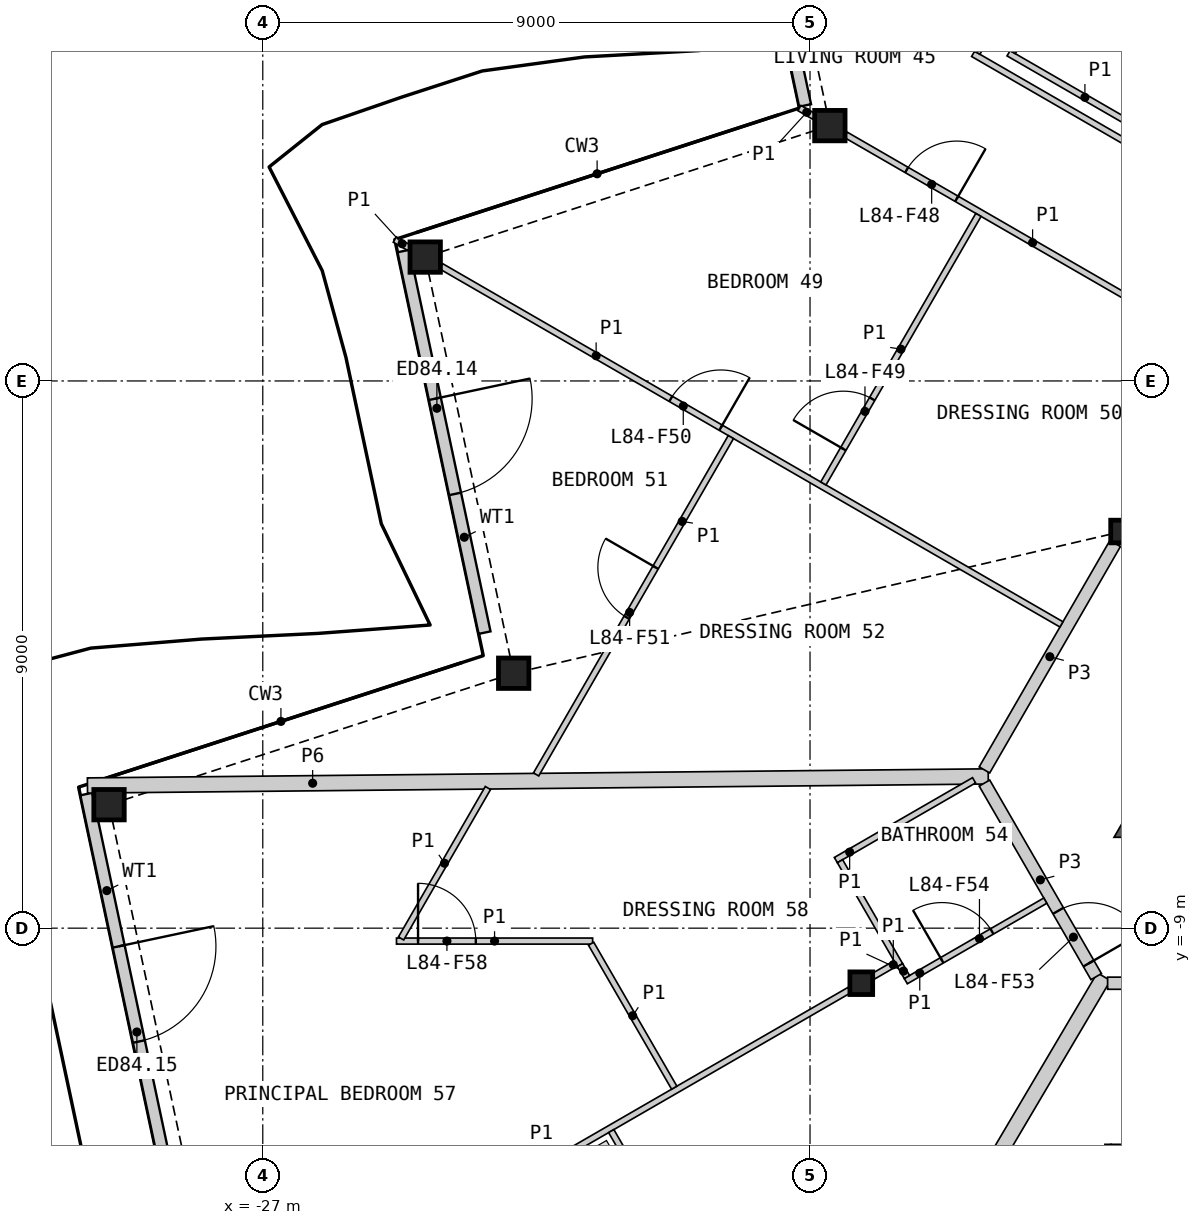
"""IFC4 building model, lengths in metres.
Left out: names, types, materials, properties, quantities, classifications, styles, units other than length and angle.
Written with IfcOpenShell. Run it as: python <this file> out.ifc"""

import sys

from ifc_helpers import new_model, si_unit, direction, frame, frame_2d, origin, origin_2d, place, context, subcontext, project, spatial, polyline, rectangle, hollow_rectangle, i_section, outline, extrude, element, fill, save


model = new_model("IFC4")
c1 = context("Model", 3, precision=1e-05, world=origin(), true_north=direction((0.0, 1.0)))
c2 = subcontext(c1, "Body", "Model", "MODEL_VIEW")
j1 = project(units=[si_unit("LENGTHUNIT", "METRE"), si_unit("PLANEANGLEUNIT", "RADIAN")], contexts=[c1])
p1 = place(None, origin())
s1 = spatial("IfcSite", under=j1, at=p1, CompositionType="ELEMENT")
p2 = place(p1, origin())
s2 = spatial("IfcBuilding", under=s1, at=p2, CompositionType="ELEMENT")
p3 = place(p2, frame((0.0, 0.0, 374.6)))
s3 = spatial("IfcBuildingStorey", under=s2, at=p3, CompositionType="ELEMENT", Elevation=374.6)
for number, where, z_axis, x_axis in (
    (1, (-17.674, 4.199, 0.0), (0.0, 0.0, 1.0), (1.0, 0.0, 0.0)),
    (2, (-24.329, 2.037, 0.0), (0.0, 0.0, 1.0), (1.0, 0.0, 0.0)),
    (3, (-22.874, -4.807, 0.0), (0.0, 0.0, 1.0), (1.0, 0.0, 0.0)),
    (4, (-29.529, -6.969, 0.0), (0.0, 0.0, 1.0), (1.0, 0.0, 0.0)),
):
    element("IfcColumn", number, at=place(p3, frame(where, z_axis=z_axis, x_axis=x_axis)), inside=s3, PredefinedType="COLUMN", context=c2, shape_type="SweptSolid", body=[
        extrude(hollow_rectangle(XDim=0.5, YDim=0.5, WallThickness=0.03, at=origin_2d()), origin(), (0.0, 0.0, 1.0), 3.4),
    ])
for number, where, z_axis, x_axis in (
    (5, (-12.868, -2.476, 0.0), (0.0, 0.0, 1.0), (1.0, 0.0, 0.0)),
    (6, (-17.157, -9.906, 0.0), (0.0, 0.0, 1.0), (1.0, 0.0, 0.0)),
):
    element("IfcColumn", number, at=place(p3, frame(where, z_axis=z_axis, x_axis=x_axis)), inside=s3, PredefinedType="COLUMN", context=c2, shape_type="SweptSolid", body=[
        extrude(i_section(OverallWidth=0.374, OverallDepth=0.372, WebThickness=0.016, FlangeThickness=0.026, at=origin_2d()), origin(), (0.0, 0.0, 1.0), 3.4),
    ])
p4 = place(p3, frame((-19.477, 11.1, 0.0), z_axis=(0.0, 0.0, 1.0), x_axis=(0.207910061304, -0.978147947096, 0.0)))
e7 = element("IfcWall", 7, at=p4, inside=s3, PredefinedType="SOLIDWALL", context=c2, shape_type="SweptSolid", body=[
    extrude(rectangle(XDim=6.716, YDim=0.2, at=frame_2d((3.358, 0.0))), origin(), (0.0, 0.0, 1.0), 2.634),
])
p5 = place(p4, frame((2.439, 0.0, 0.0)))
e8 = element("IfcOpeningElement", 8, at=p5, cuts=e7, PredefinedType="OPENING", context=c2, shape_type="SweptSolid", body=[
    extrude(rectangle(XDim=1.6, YDim=2.25, at=frame_2d((0.8, 1.125))), frame((0.0, 0.11, 0.0), z_axis=(0.0, -1.0, 0.0), x_axis=(1.0, 0.0, 0.0)), (0.0, 0.0, 1.0), 0.22),
])
p6 = place(p3, frame((-24.687, 2.137, 0.0), z_axis=(0.0, 0.0, 1.0), x_axis=(0.207904718109, -0.978149082803, 0.0)))
e9 = element("IfcWall", 9, at=p6, inside=s3, PredefinedType="SOLIDWALL", context=c2, shape_type="SweptSolid", body=[
    extrude(rectangle(XDim=6.416, YDim=0.2, at=frame_2d((3.208, 0.0))), origin(), (0.0, 0.0, 1.0), 2.634),
])
p7 = place(p6, frame((2.484, 0.0, 0.0)))
e10 = element("IfcOpeningElement", 10, at=p7, cuts=e9, PredefinedType="OPENING", context=c2, shape_type="SweptSolid", body=[
    extrude(rectangle(XDim=1.6, YDim=2.25, at=frame_2d((0.8, 1.125))), frame((0.0, 0.11, 0.0), z_axis=(0.0, -1.0, 0.0), x_axis=(1.0, 0.0, 0.0)), (0.0, 0.0, 1.0), 0.22),
])
p8 = place(p3, frame((-29.903, -6.795, 0.0), z_axis=(0.0, 0.0, 1.0), x_axis=(0.207923959653, -0.978144992832, 0.0)))
e11 = element("IfcWall", 11, at=p8, inside=s3, PredefinedType="SOLIDWALL", context=c2, shape_type="SweptSolid", body=[
    extrude(rectangle(XDim=6.493, YDim=0.2, at=frame_2d((3.247, 0.0))), origin(), (0.0, 0.0, 1.0), 2.634),
])
p9 = place(p8, frame((2.561, 0.0, 0.0)))
e12 = element("IfcOpeningElement", 12, at=p9, cuts=e11, PredefinedType="OPENING", context=c2, shape_type="SweptSolid", body=[
    extrude(rectangle(XDim=1.6, YDim=2.25, at=frame_2d((0.8, 1.125))), frame((0.0, 0.11, 0.0), z_axis=(0.0, -1.0, 0.0), x_axis=(1.0, 0.0, 0.0)), (0.0, 0.0, 1.0), 0.22),
])
p10 = place(p3, origin())
e13 = element("IfcWall", 13, at=p10, inside=s3, PredefinedType="SHEAR", context=c2, shape_type="SweptSolid", body=[
    extrude(outline(polyline([(-12.48, -6.606), (-11.961, -6.906), (-11.961, -7.506), (-13.0, -7.506), (-12.48, -6.606)])), origin(), (0.0, 0.0, 1.0), 3.1),
])
p11 = place(p3, frame((-29.883, -6.654, 0.0), z_axis=(0.0, 0.0, 1.0), x_axis=(0.999949143254, 0.010085182526, 0.0)))
e14 = element("IfcWall", 14, at=p11, inside=s3, PredefinedType="PARTITIONING", context=c2, shape_type="SweptSolid", body=[
    extrude(rectangle(XDim=14.815, YDim=0.25, at=frame_2d((7.408, 0.0))), origin(), (0.0, 0.0, 1.0), 2.33),
])
p12 = place(p3, frame((-20.351, -21.956, 0.0), z_axis=(0.0, 0.0, 1.0), x_axis=(0.508713003719, 0.860936164793, 0.0)))
e15 = element("IfcWall", 15, at=p12, inside=s3, PredefinedType="PARTITIONING", context=c2, shape_type="SweptSolid", body=[
    extrude(rectangle(XDim=14.122, YDim=0.25, at=frame_2d((7.061, 0.0))), origin(), (0.0, 0.0, 1.0), 2.33),
])
p13 = place(p3, frame((-13.106, -9.906, 0.0), z_axis=(0.0, 0.0, 1.0), x_axis=(1.0, 0.0, 0.0)))
e16 = element("IfcWall", 16, at=p13, inside=s3, PredefinedType="PARTITIONING", context=c2, shape_type="SweptSolid", body=[
    extrude(rectangle(XDim=4.331, YDim=0.2, at=frame_2d((2.165, 0.0))), origin(), (0.0, 0.0, 1.0), 3.1),
])
p14 = place(p13, frame((0.755, 0.0, 0.0)))
e17 = element("IfcOpeningElement", 17, at=p14, cuts=e16, PredefinedType="OPENING", context=c2, shape_type="SweptSolid", body=[
    extrude(rectangle(XDim=1.0, YDim=2.1, at=frame_2d((0.5, 1.05))), frame((0.0, 0.11, 0.0), z_axis=(0.0, -1.0, 0.0), x_axis=(1.0, 0.0, 0.0)), (0.0, 0.0, 1.0), 0.22),
])
p15 = place(p3, frame((-15.131, -6.397, 0.0), z_axis=(0.0, 0.0, 1.0), x_axis=(0.499986217557, 0.866033360935, 0.0)))
e18 = element("IfcWall", 18, at=p15, inside=s3, PredefinedType="PARTITIONING", context=c2, shape_type="SweptSolid", body=[
    extrude(rectangle(XDim=4.3, YDim=0.2, at=frame_2d((2.15, 0.0))), origin(), (0.0, 0.0, 1.0), 3.1),
])
p16 = place(p3, frame((-15.131, -6.614, 0.0), z_axis=(0.0, 0.0, 1.0), x_axis=(0.499967746641, -0.866044024469, 0.0)))
e19 = element("IfcWall", 19, at=p16, inside=s3, PredefinedType="PARTITIONING", context=c2, shape_type="SweptSolid", body=[
    extrude(rectangle(XDim=3.676, YDim=0.2, at=frame_2d((1.838, 0.0))), origin(), (0.0, 0.0, 1.0), 3.1),
])
p17 = place(p16, frame((2.426, 0.0, 0.0)))
e20 = element("IfcOpeningElement", 20, at=p17, cuts=e19, PredefinedType="OPENING", context=c2, shape_type="SweptSolid", body=[
    extrude(rectangle(XDim=1.0, YDim=2.1, at=frame_2d((0.5, 1.05))), frame((0.0, 0.11, 0.0), z_axis=(0.0, -1.0, 0.0), x_axis=(1.0, 0.0, 0.0)), (0.0, 0.0, 1.0), 0.22),
])
p18 = place(p3, frame((-18.869, 10.894, 0.0), z_axis=(0.0, 0.0, 1.0), x_axis=(0.866023724155, -0.500002909193, 0.0)))
e21 = element("IfcWall", 21, at=p18, inside=s3, PredefinedType="PARTITIONING", context=c2, shape_type="SweptSolid", body=[
    extrude(rectangle(XDim=11.655, YDim=0.2, at=frame_2d((5.827, 0.0))), origin(), (0.0, 0.0, 1.0), 2.33),
])
p19 = place(p3, frame((-24.069, 1.887, 0.0), z_axis=(0.0, 0.0, 1.0), x_axis=(0.866023404247, -0.500003463284, 0.0)))
e22 = element("IfcWall", 22, at=p19, inside=s3, PredefinedType="PARTITIONING", context=c2, shape_type="SweptSolid", body=[
    extrude(rectangle(XDim=11.782, YDim=0.1, at=frame_2d((5.891, 0.0))), origin(), (0.0, 0.0, 1.0), 2.33),
])
p20 = place(p19, frame((4.363, 0.0, 0.0)))
e23 = element("IfcOpeningElement", 23, at=p20, cuts=e22, PredefinedType="OPENING", context=c2, shape_type="SweptSolid", body=[
    extrude(rectangle(XDim=0.95, YDim=2.1, at=frame_2d((0.475, 1.05))), frame((0.0, 0.06, 0.0), z_axis=(0.0, -1.0, 0.0), x_axis=(1.0, 0.0, 0.0)), (0.0, 0.0, 1.0), 0.12),
])
p21 = place(p3, frame((-26.777, -15.46, 0.0), z_axis=(0.0, 0.0, 1.0), x_axis=(0.866019680922, 0.500009912158, 0.0)))
e24 = element("IfcWall", 24, at=p21, inside=s3, PredefinedType="PARTITIONING", context=c2, shape_type="SweptSolid", body=[
    extrude(rectangle(XDim=10.881, YDim=0.1, at=frame_2d((5.44, 0.0))), origin(), (0.0, 0.0, 1.0), 2.33),
])
p22 = place(p21, frame((1.454, 0.0, 0.0)))
e25 = element("IfcOpeningElement", 25, at=p22, cuts=e24, PredefinedType="OPENING", context=c2, shape_type="SweptSolid", body=[
    extrude(rectangle(XDim=0.95, YDim=2.1, at=frame_2d((0.475, 1.05))), frame((0.0, 0.06, 0.0), z_axis=(0.0, -1.0, 0.0), x_axis=(1.0, 0.0, 0.0)), (0.0, 0.0, 1.0), 0.12),
])
p23 = place(p3, frame((-17.414, 4.049, 0.0), z_axis=(0.0, 0.0, 1.0), x_axis=(0.866033839264, -0.499985389037, 0.0)))
e26 = element("IfcWall", 26, at=p23, inside=s3, PredefinedType="PARTITIONING", context=c2, shape_type="SweptSolid", body=[
    extrude(rectangle(XDim=7.1, YDim=0.1, at=frame_2d((3.55, 0.0))), origin(), (0.0, 0.0, 1.0), 2.33),
])
p24 = place(p23, frame((1.158, 0.0, 0.0)))
e27 = element("IfcOpeningElement", 27, at=p24, cuts=e26, PredefinedType="OPENING", context=c2, shape_type="SweptSolid", body=[
    extrude(rectangle(XDim=0.95, YDim=2.1, at=frame_2d((0.475, 1.05))), frame((0.0, 0.06, 0.0), z_axis=(0.0, -1.0, 0.0), x_axis=(1.0, 0.0, 0.0)), (0.0, 0.0, 1.0), 0.12),
])
p25 = place(p3, frame((-22.505, -6.472, 0.0), z_axis=(0.0, 0.0, 1.0), x_axis=(0.499999516514, 0.866025682925, 0.0)))
e28 = element("IfcWall", 28, at=p25, inside=s3, PredefinedType="PARTITIONING", context=c2, shape_type="SweptSolid", body=[
    extrude(rectangle(XDim=6.407, YDim=0.1, at=frame_2d((3.204, 0.0))), origin(), (0.0, 0.0, 1.0), 2.33),
])
p26 = place(p25, frame((2.981, 0.0, 0.0)))
e29 = element("IfcOpeningElement", 29, at=p26, cuts=e28, PredefinedType="OPENING", context=c2, shape_type="SweptSolid", body=[
    extrude(rectangle(XDim=0.95, YDim=2.1, at=frame_2d((0.475, 1.05))), frame((0.0, 0.06, 0.0), z_axis=(0.0, -1.0, 0.0), x_axis=(1.0, 0.0, 0.0)), (0.0, 0.0, 1.0), 0.12),
])
p27 = place(p3, frame((-21.269, -12.337, 0.0), z_axis=(0.0, 0.0, 1.0), x_axis=(0.499983315828, -0.866035036182, 0.0)))
e30 = element("IfcWall", 30, at=p27, inside=s3, PredefinedType="PARTITIONING", context=c2, shape_type="SweptSolid", body=[
    extrude(rectangle(XDim=6.4, YDim=0.1, at=frame_2d((3.2, 0.0))), origin(), (0.0, 0.0, 1.0), 2.33),
])
p28 = place(p27, frame((3.584, 0.0, 0.0)))
e31 = element("IfcOpeningElement", 31, at=p28, cuts=e30, PredefinedType="OPENING", context=c2, shape_type="SweptSolid", body=[
    extrude(rectangle(XDim=0.95, YDim=2.1, at=frame_2d((0.475, 1.05))), frame((0.0, 0.06, 0.0), z_axis=(0.0, -1.0, 0.0), x_axis=(1.0, 0.0, 0.0)), (0.0, 0.0, 1.0), 0.12),
])
p29 = place(p3, frame((-15.318, 5.38, 0.0), z_axis=(0.0, 0.0, 1.0), x_axis=(0.866035260786, -0.499982926783, 0.0)))
e32 = element("IfcWall", 32, at=p29, inside=s3, PredefinedType="PARTITIONING", context=c2, shape_type="SweptSolid", body=[
    extrude(rectangle(XDim=5.95, YDim=0.1, at=frame_2d((2.975, 0.0))), origin(), (0.0, 0.0, 1.0), 2.33),
])
p30 = place(p3, frame((-17.78, -1.686, 0.0), z_axis=(0.0, 0.0, 1.0), x_axis=(0.500005610874, 0.86602216432, 0.0)))
e33 = element("IfcWall", 33, at=p30, inside=s3, PredefinedType="PARTITIONING", context=c2, shape_type="SweptSolid", body=[
    extrude(rectangle(XDim=5.1, YDim=0.1, at=frame_2d((2.55, 0.0))), origin(), (0.0, 0.0, 1.0), 2.33),
])
p31 = place(p30, frame((0.656, 0.0, 0.0)))
e34 = element("IfcOpeningElement", 34, at=p31, cuts=e33, PredefinedType="OPENING", context=c2, shape_type="SweptSolid", body=[
    extrude(rectangle(XDim=0.95, YDim=2.1, at=frame_2d((0.475, 1.05))), frame((0.0, 0.06, 0.0), z_axis=(0.0, -1.0, 0.0), x_axis=(1.0, 0.0, 0.0)), (0.0, 0.0, 1.0), 0.12),
])
p32 = place(p3, frame((-24.801, -9.212, 0.0), z_axis=(0.0, 0.0, 1.0), x_axis=(1.0, 0.0, 0.0)))
e35 = element("IfcWall", 35, at=p32, inside=s3, PredefinedType="PARTITIONING", context=c2, shape_type="SweptSolid", body=[
    extrude(rectangle(XDim=3.226, YDim=0.1, at=frame_2d((1.613, 0.0))), origin(), (0.0, 0.0, 1.0), 2.33),
])
p33 = place(p32, frame((0.354, 0.0, 0.0)))
e36 = element("IfcOpeningElement", 36, at=p33, cuts=e35, PredefinedType="OPENING", context=c2, shape_type="SweptSolid", body=[
    extrude(rectangle(XDim=0.95, YDim=2.1, at=frame_2d((0.475, 1.05))), frame((0.0, 0.06, 0.0), z_axis=(0.0, -1.0, 0.0), x_axis=(1.0, 0.0, 0.0)), (0.0, 0.0, 1.0), 0.12),
])
p34 = place(p3, frame((-24.726, -9.169, 0.0), z_axis=(0.0, 0.0, 1.0), x_axis=(0.499971481985, 0.866041868042, 0.0)))
e37 = element("IfcWall", 37, at=p34, inside=s3, PredefinedType="PARTITIONING", context=c2, shape_type="SweptSolid", body=[
    extrude(rectangle(XDim=2.857, YDim=0.1, at=frame_2d((1.429, 0.0))), origin(), (0.0, 0.0, 1.0), 2.33),
])
p35 = place(p3, frame((-15.25, 5.398, 0.0), z_axis=(0.0, 0.0, 1.0), x_axis=(0.499935029643, 0.866062911188, 0.0)))
e38 = element("IfcWall", 38, at=p35, inside=s3, PredefinedType="PARTITIONING", context=c2, shape_type="SweptSolid", body=[
    extrude(rectangle(XDim=2.85, YDim=0.1, at=frame_2d((1.425, 0.0))), origin(), (0.0, 0.0, 1.0), 2.33),
])
p36 = place(p35, frame((0.35, 0.0, 0.0)))
e39 = element("IfcOpeningElement", 39, at=p36, cuts=e38, PredefinedType="OPENING", context=c2, shape_type="SweptSolid", body=[
    extrude(rectangle(XDim=0.95, YDim=2.1, at=frame_2d((0.475, 1.05))), frame((0.0, 0.06, 0.0), z_axis=(0.0, -1.0, 0.0), x_axis=(1.0, 0.0, 0.0)), (0.0, 0.0, 1.0), 0.12),
])
p37 = place(p3, frame((-21.6, -9.256, 0.0), z_axis=(0.0, 0.0, 1.0), x_axis=(0.500018733116, -0.866014587945, 0.0)))
e40 = element("IfcWall", 40, at=p37, inside=s3, PredefinedType="PARTITIONING", context=c2, shape_type="SweptSolid", body=[
    extrude(rectangle(XDim=2.734, YDim=0.1, at=frame_2d((1.367, 0.0))), origin(), (0.0, 0.0, 1.0), 2.33),
])
p38 = place(p3, frame((-14.735, 5.389, 0.0), z_axis=(0.0, 0.0, 1.0), x_axis=(0.866032775405, -0.499987231761, 0.0)))
e41 = element("IfcWall", 41, at=p38, inside=s3, PredefinedType="PARTITIONING", context=c2, shape_type="SweptSolid", body=[
    extrude(rectangle(XDim=2.9, YDim=0.1, at=frame_2d((1.45, 0.0))), origin(), (0.0, 0.0, 1.0), 2.33),
])
p39 = place(p3, frame((-13.1, -15.356, 0.0), z_axis=(0.0, 0.0, 1.0), x_axis=(0.0, 1.0, 0.0)))
e42 = element("IfcWall", 42, at=p39, inside=s3, PredefinedType="PARTITIONING", context=c2, shape_type="SweptSolid", body=[
    extrude(rectangle(XDim=2.8, YDim=0.1, at=frame_2d((1.4, 0.0))), origin(), (0.0, 0.0, 1.0), 2.33),
])
p40 = place(p3, frame((-17.575, -7.881, 0.0), z_axis=(0.0, 0.0, 1.0), x_axis=(0.866036909293, 0.499980071345, 0.0)))
e43 = element("IfcWall", 43, at=p40, inside=s3, PredefinedType="PARTITIONING", context=c2, shape_type="SweptSolid", body=[
    extrude(rectangle(XDim=2.625, YDim=0.1, at=frame_2d((1.312, 0.0))), origin(), (0.0, 0.0, 1.0), 2.33),
])
p41 = place(p3, frame((-13.05, -12.606, 0.0), z_axis=(0.0, 0.0, 1.0), x_axis=(1.0, 0.0, 0.0)))
e44 = element("IfcWall", 44, at=p41, inside=s3, PredefinedType="PARTITIONING", context=c2, shape_type="SweptSolid", body=[
    extrude(rectangle(XDim=2.525, YDim=0.1, at=frame_2d((1.263, 0.0))), origin(), (0.0, 0.0, 1.0), 2.33),
])
p42 = place(p3, frame((-14.667, 5.408, 0.0), z_axis=(0.0, 0.0, 1.0), x_axis=(0.499948979701, 0.866054858364, 0.0)))
e45 = element("IfcWall", 45, at=p42, inside=s3, PredefinedType="PARTITIONING", context=c2, shape_type="SweptSolid", body=[
    extrude(rectangle(XDim=2.55, YDim=0.1, at=frame_2d((1.275, 0.0))), origin(), (0.0, 0.0, 1.0), 2.33),
])
p43 = place(p3, frame((-16.425, -9.872, 0.0), z_axis=(0.0, 0.0, 1.0), x_axis=(0.86603978909, 0.499975083092, 0.0)))
e46 = element("IfcWall", 46, at=p43, inside=s3, PredefinedType="PARTITIONING", context=c2, shape_type="SweptSolid", body=[
    extrude(rectangle(XDim=2.649, YDim=0.1, at=frame_2d((1.325, 0.0))), origin(), (0.0, 0.0, 1.0), 2.33),
])
p44 = place(p43, frame((0.686, 0.0, 0.0)))
e47 = element("IfcOpeningElement", 47, at=p44, cuts=e46, PredefinedType="OPENING", context=c2, shape_type="SweptSolid", body=[
    extrude(rectangle(XDim=0.95, YDim=2.1, at=frame_2d((0.475, 1.05))), frame((0.0, 0.06, 0.0), z_axis=(0.0, -1.0, 0.0), x_axis=(1.0, 0.0, 0.0)), (0.0, 0.0, 1.0), 0.12),
])
p45 = place(p3, frame((-17.507, -7.899, 0.0), z_axis=(0.0, 0.0, 1.0), x_axis=(0.500011643316, -0.866018681408, 0.0)))
e48 = element("IfcWall", 48, at=p45, inside=s3, PredefinedType="PARTITIONING", context=c2, shape_type="SweptSolid", body=[
    extrude(rectangle(XDim=1.973, YDim=0.1, at=frame_2d((0.987, 0.0))), origin(), (0.0, 0.0, 1.0), 2.33),
])
p46 = place(p3, frame((-16.96, -9.792, 0.0), z_axis=(0.0, 0.0, 1.0), x_axis=(0.866137484628, 0.499805820016, 0.0)))
e49 = element("IfcWall", 49, at=p46, inside=s3, PredefinedType="PARTITIONING", context=c2, shape_type="SweptSolid", body=[
    extrude(rectangle(XDim=0.423, YDim=0.1, at=frame_2d((0.211, 0.0))), origin(), (0.0, 0.0, 1.0), 2.33),
])
for number, where, z_axis, x_axis in (
    (50, (-18.174, 4.488, 0.0), (0.0, 0.0, 1.0), (0.866, -0.5, 0.0)),
    (51, (-24.829, 2.326, 0.0), (0.0, 0.0, 1.0), (0.866, -0.5, 0.0)),
):
    element("IfcWall", number, at=place(p3, frame(where, z_axis=z_axis, x_axis=x_axis)), inside=s3, PredefinedType="PARTITIONING", context=c2, shape_type="SweptSolid", body=[
        extrude(rectangle(XDim=0.278, YDim=0.1, at=frame_2d((0.139, 0.0))), origin(), (0.0, 0.0, 1.0), 2.33),
    ])
p47 = place(p3, frame((-16.519, -9.61, 0.0), z_axis=(0.0, 0.0, 1.0), x_axis=(0.50245032488, -0.864606078528, 0.0)))
e52 = element("IfcWall", 52, at=p47, inside=s3, PredefinedType="PARTITIONING", context=c2, shape_type="SweptSolid", body=[
    extrude(rectangle(XDim=0.224, YDim=0.1, at=frame_2d((0.112, 0.0))), origin(), (0.0, 0.0, 1.0), 2.33),
])
p48 = place(p7, origin())
e53 = element("IfcDoor", 53, at=p48, inside=s3, OperationType="DOUBLE_DOOR_SINGLE_SWING", PredefinedType="DOOR", context=c2, shape_type="SweptSolid", body=[
    extrude(rectangle(XDim=1.6, YDim=2.25, at=frame_2d((0.8, 1.125))), frame((0.0, 0.025, 0.0), z_axis=(0.0, -1.0, 0.0), x_axis=(1.0, 0.0, 0.0)), (0.0, 0.0, 1.0), 0.05),
])
fill(e10, e53)
p49 = place(p9, origin())
e54 = element("IfcDoor", 54, at=p49, inside=s3, OperationType="DOUBLE_DOOR_SINGLE_SWING", PredefinedType="DOOR", context=c2, shape_type="SweptSolid", body=[
    extrude(rectangle(XDim=1.6, YDim=2.25, at=frame_2d((0.8, 1.125))), frame((0.0, 0.025, 0.0), z_axis=(0.0, -1.0, 0.0), x_axis=(1.0, 0.0, 0.0)), (0.0, 0.0, 1.0), 0.05),
])
fill(e12, e54)
p50 = place(p24, origin())
e55 = element("IfcDoor", 55, at=p50, inside=s3, OperationType="SINGLE_SWING_RIGHT", PredefinedType="DOOR", context=c2, shape_type="SweptSolid", body=[
    extrude(rectangle(XDim=0.95, YDim=2.1, at=frame_2d((0.475, 1.05))), frame((0.0, 0.025, 0.0), z_axis=(0.0, -1.0, 0.0), x_axis=(1.0, 0.0, 0.0)), (0.0, 0.0, 1.0), 0.05),
])
fill(e27, e55)
p51 = place(p31, origin())
e56 = element("IfcDoor", 56, at=p51, inside=s3, OperationType="SINGLE_SWING_LEFT", PredefinedType="DOOR", context=c2, shape_type="SweptSolid", body=[
    extrude(rectangle(XDim=0.95, YDim=2.1, at=frame_2d((0.475, 1.05))), frame((0.0, 0.025, 0.0), z_axis=(0.0, -1.0, 0.0), x_axis=(1.0, 0.0, 0.0)), (0.0, 0.0, 1.0), 0.05),
])
fill(e34, e56)
p52 = place(p20, origin())
e57 = element("IfcDoor", 57, at=p52, inside=s3, OperationType="SINGLE_SWING_RIGHT", PredefinedType="DOOR", context=c2, shape_type="SweptSolid", body=[
    extrude(rectangle(XDim=0.95, YDim=2.1, at=frame_2d((0.475, 1.05))), frame((0.0, 0.025, 0.0), z_axis=(0.0, -1.0, 0.0), x_axis=(1.0, 0.0, 0.0)), (0.0, 0.0, 1.0), 0.05),
])
fill(e23, e57)
p53 = place(p26, origin())
e58 = element("IfcDoor", 58, at=p53, inside=s3, OperationType="SINGLE_SWING_RIGHT", PredefinedType="DOOR", context=c2, shape_type="SweptSolid", body=[
    extrude(rectangle(XDim=0.95, YDim=2.1, at=frame_2d((0.475, 1.05))), frame((0.0, 0.025, 0.0), z_axis=(0.0, -1.0, 0.0), x_axis=(1.0, 0.0, 0.0)), (0.0, 0.0, 1.0), 0.05),
])
fill(e29, e58)
p54 = place(p17, origin())
e59 = element("IfcDoor", 59, at=p54, inside=s3, OperationType="SINGLE_SWING_RIGHT", PredefinedType="DOOR", context=c2, shape_type="SweptSolid", body=[
    extrude(rectangle(XDim=1.0, YDim=2.1, at=frame_2d((0.5, 1.05))), frame((0.0, 0.025, 0.0), z_axis=(0.0, -1.0, 0.0), x_axis=(1.0, 0.0, 0.0)), (0.0, 0.0, 1.0), 0.05),
])
fill(e20, e59)
p55 = place(p44, origin())
e60 = element("IfcDoor", 60, at=p55, inside=s3, OperationType="SINGLE_SWING_LEFT", PredefinedType="DOOR", context=c2, shape_type="SweptSolid", body=[
    extrude(rectangle(XDim=0.95, YDim=2.1, at=frame_2d((0.475, 1.05))), frame((0.0, 0.025, 0.0), z_axis=(0.0, -1.0, 0.0), x_axis=(1.0, 0.0, 0.0)), (0.0, 0.0, 1.0), 0.05),
])
fill(e47, e60)
p56 = place(p33, origin())
e61 = element("IfcDoor", 61, at=p56, inside=s3, OperationType="SINGLE_SWING_LEFT", PredefinedType="DOOR", context=c2, shape_type="SweptSolid", body=[
    extrude(rectangle(XDim=0.95, YDim=2.1, at=frame_2d((0.475, 1.05))), frame((0.0, 0.025, 0.0), z_axis=(0.0, -1.0, 0.0), x_axis=(1.0, 0.0, 0.0)), (0.0, 0.0, 1.0), 0.05),
])
fill(e36, e61)
save(model, sys.argv[1])
